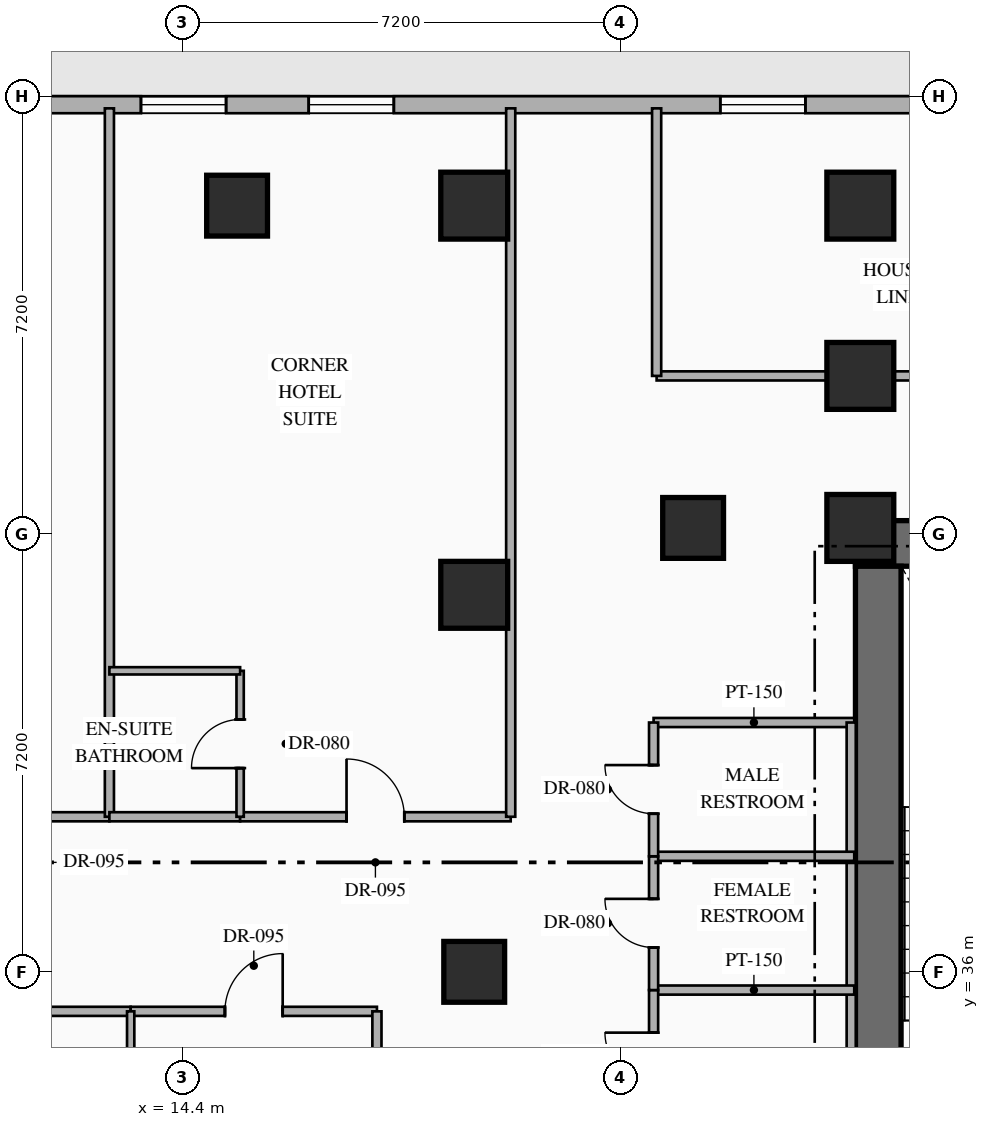
"""IFC4 building model, lengths in metres.
Left out: names, types, materials, properties, quantities, classifications, styles, units other than length and angle.
Written with IfcOpenShell. Run it as: python <this file> out.ifc"""

import sys

from ifc_helpers import new_model, si_unit, direction, frame, frame_2d, origin, origin_2d, place, context, subcontext, project, spatial, rectangle, hollow_rectangle, extrude, element, fill, save


model = new_model("IFC4")
c1 = context("Model", 3, precision=1e-05, world=origin(), true_north=direction((0.0, 1.0)))
c2 = subcontext(c1, "Body", "Model", "MODEL_VIEW")
j1 = project(units=[si_unit("LENGTHUNIT", "METRE"), si_unit("PLANEANGLEUNIT", "RADIAN")], contexts=[c1])
p1 = place(None, origin())
s1 = spatial("IfcSite", under=j1, at=p1, CompositionType="ELEMENT")
p2 = place(p1, origin())
s2 = spatial("IfcBuilding", under=s1, at=p2, CompositionType="ELEMENT")
p3 = place(p2, frame((0.0, 0.0, 50.0)))
s3 = spatial("IfcBuildingStorey", under=s2, at=p3, CompositionType="ELEMENT", Elevation=50.0)
p4 = place(p3, frame((25.47, 43.045, 0.0), z_axis=(0.0, 0.0, 1.0), x_axis=(1.0, 0.0, 0.0)))
e1 = element("IfcWall", 1, at=p4, inside=s3, PredefinedType="SHEAR", context=c2, shape_type="SweptSolid", body=[
    extrude(rectangle(XDim=8.08, YDim=0.75, at=frame_2d((4.04, 0.0))), origin(), (0.0, 0.0, 1.0), 3.35),
])
p5 = place(p3, frame((25.845, 33.19, 0.0), z_axis=(0.0, 0.0, 1.0), x_axis=(0.0, 1.0, 0.0)))
e2 = element("IfcWall", 2, at=p5, inside=s3, PredefinedType="SHEAR", context=c2, shape_type="SweptSolid", body=[
    extrude(rectangle(XDim=9.48, YDim=0.75, at=frame_2d((4.74, 0.0))), origin(), (0.0, 0.0, 1.0), 3.35),
])
p6 = place(p3, frame((25.55, 43.3, 0.0), z_axis=(0.0, 0.0, 1.0), x_axis=(1.0, 0.0, 0.0)))
e3 = element("IfcColumn", 3, at=p6, inside=s3, PredefinedType="COLUMN", context=c2, shape_type="SweptSolid", body=[
    extrude(rectangle(XDim=1.1, YDim=1.1, at=origin_2d()), origin(), (0.0, 0.0, 1.0), 3.35),
])
for number, where, z_axis, x_axis in (
    (4, (25.55, 45.8, 0.0), (0.0, 0.0, 1.0), (1.0, 0.0, 0.0)),
    (5, (19.2, 48.6, 0.0), (0.0, 0.0, 1.0), (1.0, 0.0, 0.0)),
    (6, (25.55, 48.6, 0.0), (0.0, 0.0, 1.0), (1.0, 0.0, 0.0)),
    (7, (19.2, 42.2, 0.0), (0.0, 0.0, 1.0), (1.0, 0.0, 0.0)),
):
    element("IfcColumn", number, at=place(p3, frame(where, z_axis=z_axis, x_axis=x_axis)), inside=s3, PredefinedType="COLUMN", context=c2, shape_type="SweptSolid", body=[
        extrude(hollow_rectangle(XDim=1.1, YDim=1.1, WallThickness=0.04, at=origin_2d()), origin(), (0.0, 0.0, 1.0), 3.35),
    ])
for number, where, z_axis, x_axis in (
    (8, (22.8, 43.3, 0.0), (0.0, 0.0, 1.0), (1.0, 0.0, 0.0)),
    (9, (19.2, 36.0, 0.0), (0.0, 0.0, 1.0), (1.0, 0.0, 0.0)),
    (10, (15.3, 48.6, 0.0), (0.0, 0.0, 1.0), (1.0, 0.0, 0.0)),
):
    element("IfcColumn", number, at=place(p3, frame(where, z_axis=z_axis, x_axis=x_axis)), inside=s3, PredefinedType="COLUMN", context=c2, shape_type="SweptSolid", body=[
        extrude(hollow_rectangle(XDim=1.0, YDim=1.0, WallThickness=0.038, at=origin_2d()), origin(), (0.0, 0.0, 1.0), 3.35),
    ])
p7 = place(p3, frame((2.458, 50.26, 0.0), z_axis=(0.0, 0.0, 1.0), x_axis=(1.0, 0.0, 0.0)))
e11 = element("IfcWall", 11, at=p7, inside=s3, PredefinedType="STANDARD", context=c2, shape_type="SweptSolid", body=[
    extrude(rectangle(XDim=40.084, YDim=0.28, at=frame_2d((20.042, 0.0))), origin(), (0.0, 0.0, 1.0), 3.13),
])
p8 = place(p7, frame((25.905, 0.0, 0.0)))
e12 = element("IfcOpeningElement", 12, at=p8, cuts=e11, PredefinedType="OPENING", context=c2, shape_type="SweptSolid", body=[
    extrude(rectangle(XDim=1.1, YDim=2.2, at=frame_2d((0.55, 1.1))), frame((0.0, 0.15, 0.0), z_axis=(0.0, -1.0, 0.0), x_axis=(1.0, 0.0, 0.0)), (0.0, 0.0, 1.0), 0.3),
])
p9 = place(p7, frame((1.717, 0.0, 0.85)))
e13 = element("IfcOpeningElement", 13, at=p9, cuts=e11, PredefinedType="OPENING", context=c2, shape_type="SweptSolid", body=[
    extrude(rectangle(XDim=1.4, YDim=1.8, at=frame_2d((0.7, 0.9))), frame((0.0, 0.15, 0.0), z_axis=(0.0, -1.0, 0.0), x_axis=(1.0, 0.0, 0.0)), (0.0, 0.0, 1.0), 0.3),
])
p10 = place(p7, frame((5.981, 0.0, 0.85)))
e14 = element("IfcOpeningElement", 14, at=p10, cuts=e11, PredefinedType="OPENING", context=c2, shape_type="SweptSolid", body=[
    extrude(rectangle(XDim=1.4, YDim=1.8, at=frame_2d((0.7, 0.9))), frame((0.0, 0.15, 0.0), z_axis=(0.0, -1.0, 0.0), x_axis=(1.0, 0.0, 0.0)), (0.0, 0.0, 1.0), 0.3),
])
p11 = place(p7, frame((11.261, 0.0, 0.85)))
e15 = element("IfcOpeningElement", 15, at=p11, cuts=e11, PredefinedType="OPENING", context=c2, shape_type="SweptSolid", body=[
    extrude(rectangle(XDim=1.4, YDim=1.8, at=frame_2d((0.7, 0.9))), frame((0.0, 0.15, 0.0), z_axis=(0.0, -1.0, 0.0), x_axis=(1.0, 0.0, 0.0)), (0.0, 0.0, 1.0), 0.3),
])
p12 = place(p7, frame((14.02, 0.0, 0.85)))
e16 = element("IfcOpeningElement", 16, at=p12, cuts=e11, PredefinedType="OPENING", context=c2, shape_type="SweptSolid", body=[
    extrude(rectangle(XDim=1.4, YDim=1.8, at=frame_2d((0.7, 0.9))), frame((0.0, 0.15, 0.0), z_axis=(0.0, -1.0, 0.0), x_axis=(1.0, 0.0, 0.0)), (0.0, 0.0, 1.0), 0.3),
])
p13 = place(p7, frame((20.789, 0.0, 0.85)))
e17 = element("IfcOpeningElement", 17, at=p13, cuts=e11, PredefinedType="OPENING", context=c2, shape_type="SweptSolid", body=[
    extrude(rectangle(XDim=1.4, YDim=1.8, at=frame_2d((0.7, 0.9))), frame((0.0, 0.15, 0.0), z_axis=(0.0, -1.0, 0.0), x_axis=(1.0, 0.0, 0.0)), (0.0, 0.0, 1.0), 0.3),
])
p14 = place(p7, frame((32.703, 0.0, 0.85)))
e18 = element("IfcOpeningElement", 18, at=p14, cuts=e11, PredefinedType="OPENING", context=c2, shape_type="SweptSolid", body=[
    extrude(rectangle(XDim=1.4, YDim=1.8, at=frame_2d((0.7, 0.9))), frame((0.0, 0.15, 0.0), z_axis=(0.0, -1.0, 0.0), x_axis=(1.0, 0.0, 0.0)), (0.0, 0.0, 1.0), 0.3),
])
p15 = place(p7, frame((36.967, 0.0, 0.85)))
e19 = element("IfcOpeningElement", 19, at=p15, cuts=e11, PredefinedType="OPENING", context=c2, shape_type="SweptSolid", body=[
    extrude(rectangle(XDim=1.4, YDim=1.8, at=frame_2d((0.7, 0.9))), frame((0.0, 0.15, 0.0), z_axis=(0.0, -1.0, 0.0), x_axis=(1.0, 0.0, 0.0)), (0.0, 0.0, 1.0), 0.3),
])
p16 = place(p3, frame((22.15, 40.1, 0.0), z_axis=(0.0, 0.0, 1.0), x_axis=(1.0, 0.0, 0.0)))
e20 = element("IfcWall", 20, at=p16, inside=s3, PredefinedType="PARTITIONING", context=c2, shape_type="SweptSolid", body=[
    extrude(rectangle(XDim=3.3, YDim=0.15, at=frame_2d((1.65, 0.0))), origin(), (0.0, 0.0, 1.0), 3.13),
])
p17 = place(p3, frame((25.4, 33.5, 0.0), z_axis=(0.0, 0.0, 1.0), x_axis=(0.0, 1.0, 0.0)))
e21 = element("IfcWall", 21, at=p17, inside=s3, PredefinedType="PARTITIONING", context=c2, shape_type="SweptSolid", body=[
    extrude(rectangle(XDim=6.6, YDim=0.15, at=frame_2d((3.3, 0.0))), origin(), (0.0, 0.0, 1.0), 3.13),
])
for number, where, z_axis, x_axis in (
    (22, (22.15, 35.7, 0.0), (0.0, 0.0, 1.0), (1.0, 0.0, 0.0)),
    (23, (22.15, 37.9, 0.0), (0.0, 0.0, 1.0), (1.0, 0.0, 0.0)),
):
    element("IfcWall", number, at=place(p3, frame(where, z_axis=z_axis, x_axis=x_axis)), inside=s3, PredefinedType="PARTITIONING", context=c2, shape_type="SweptSolid", body=[
        extrude(rectangle(XDim=3.3, YDim=0.15, at=frame_2d((1.65, 0.0))), origin(), (0.0, 0.0, 1.0), 3.13),
    ])
p18 = place(p3, frame((22.15, 33.5, 0.0), z_axis=(0.0, 0.0, 1.0), x_axis=(0.0, 1.0, 0.0)))
e24 = element("IfcWall", 24, at=p18, inside=s3, PredefinedType="PARTITIONING", context=c2, shape_type="SweptSolid", body=[
    extrude(rectangle(XDim=2.2, YDim=0.15, at=frame_2d((1.1, 0.0))), origin(), (0.0, 0.0, 1.0), 3.13),
])
p19 = place(p18, frame((0.7, 0.0, 0.0)))
e25 = element("IfcOpeningElement", 25, at=p19, cuts=e24, PredefinedType="OPENING", context=c2, shape_type="SweptSolid", body=[
    extrude(rectangle(XDim=0.8, YDim=2.06, at=frame_2d((0.4, 1.03))), frame((0.0, 0.085, 0.0), z_axis=(0.0, -1.0, 0.0), x_axis=(1.0, 0.0, 0.0)), (0.0, 0.0, 1.0), 0.17),
])
p20 = place(p3, frame((22.15, 35.7, 0.0), z_axis=(0.0, 0.0, 1.0), x_axis=(0.0, 1.0, 0.0)))
e26 = element("IfcWall", 26, at=p20, inside=s3, PredefinedType="PARTITIONING", context=c2, shape_type="SweptSolid", body=[
    extrude(rectangle(XDim=2.2, YDim=0.15, at=frame_2d((1.1, 0.0))), origin(), (0.0, 0.0, 1.0), 3.13),
])
p21 = place(p20, frame((0.7, 0.0, 0.0)))
e27 = element("IfcOpeningElement", 27, at=p21, cuts=e26, PredefinedType="OPENING", context=c2, shape_type="SweptSolid", body=[
    extrude(rectangle(XDim=0.8, YDim=2.06, at=frame_2d((0.4, 1.03))), frame((0.0, 0.085, 0.0), z_axis=(0.0, -1.0, 0.0), x_axis=(1.0, 0.0, 0.0)), (0.0, 0.0, 1.0), 0.17),
])
p22 = place(p3, frame((22.15, 37.9, 0.0), z_axis=(0.0, 0.0, 1.0), x_axis=(0.0, 1.0, 0.0)))
e28 = element("IfcWall", 28, at=p22, inside=s3, PredefinedType="PARTITIONING", context=c2, shape_type="SweptSolid", body=[
    extrude(rectangle(XDim=2.2, YDim=0.15, at=frame_2d((1.1, 0.0))), origin(), (0.0, 0.0, 1.0), 3.13),
])
p23 = place(p22, frame((0.7, 0.0, 0.0)))
e29 = element("IfcOpeningElement", 29, at=p23, cuts=e28, PredefinedType="OPENING", context=c2, shape_type="SweptSolid", body=[
    extrude(rectangle(XDim=0.8, YDim=2.06, at=frame_2d((0.4, 1.03))), frame((0.0, 0.085, 0.0), z_axis=(0.0, -1.0, 0.0), x_axis=(1.0, 0.0, 0.0)), (0.0, 0.0, 1.0), 0.17),
])
p24 = place(p3, frame((22.2, 45.8, 0.0), z_axis=(0.0, 0.0, 1.0), x_axis=(1.0, 0.0, 0.0)))
e30 = element("IfcWall", 30, at=p24, inside=s3, PredefinedType="PARTITIONING", context=c2, shape_type="SweptSolid", body=[
    extrude(rectangle(XDim=9.2, YDim=0.15, at=frame_2d((4.6, 0.0))), origin(), (0.0, 0.0, 1.0), 2.425),
])
p25 = place(p24, frame((5.248, 0.0, 0.0)))
e31 = element("IfcOpeningElement", 31, at=p25, cuts=e30, PredefinedType="OPENING", context=c2, shape_type="SweptSolid", body=[
    extrude(rectangle(XDim=0.95, YDim=2.15, at=frame_2d((0.475, 1.075))), frame((0.0, 0.085, 0.0), z_axis=(0.0, -1.0, 0.0), x_axis=(1.0, 0.0, 0.0)), (0.0, 0.0, 1.0), 0.17),
])
p26 = place(p3, frame((22.2, 45.8, 0.0), z_axis=(0.0, 0.0, 1.0), x_axis=(0.0, 1.0, 0.0)))
e32 = element("IfcWall", 32, at=p26, inside=s3, PredefinedType="PARTITIONING", context=c2, shape_type="SweptSolid", body=[
    extrude(rectangle(XDim=4.4, YDim=0.15, at=frame_2d((2.2, 0.0))), origin(), (0.0, 0.0, 1.0), 3.13),
])
p27 = place(p3, frame((8.95, 38.55, 0.0), z_axis=(0.0, 0.0, 1.0), x_axis=(1.0, 0.0, 0.0)))
e33 = element("IfcWall", 33, at=p27, inside=s3, PredefinedType="PARTITIONING", context=c2, shape_type="SweptSolid", body=[
    extrude(rectangle(XDim=4.25, YDim=0.15, at=frame_2d((2.125, 0.0))), origin(), (0.0, 0.0, 1.0), 2.775),
])
p28 = place(p27, frame((1.65, 0.0, 0.0)))
e34 = element("IfcOpeningElement", 34, at=p28, cuts=e33, PredefinedType="OPENING", context=c2, shape_type="SweptSolid", body=[
    extrude(rectangle(XDim=0.95, YDim=2.15, at=frame_2d((0.475, 1.075))), frame((0.0, 0.085, 0.0), z_axis=(0.0, -1.0, 0.0), x_axis=(1.0, 0.0, 0.0)), (0.0, 0.0, 1.0), 0.17),
])
p29 = place(p3, frame((13.2, 38.55, 0.0), z_axis=(0.0, 0.0, 1.0), x_axis=(0.0, 1.0, 0.0)))
e35 = element("IfcWall", 35, at=p29, inside=s3, PredefinedType="PARTITIONING", context=c2, shape_type="SweptSolid", body=[
    extrude(rectangle(XDim=11.65, YDim=0.15, at=frame_2d((5.825, 0.0))), origin(), (0.0, 0.0, 1.0), 3.13),
])
p30 = place(p3, frame((13.2, 38.55, 0.0), z_axis=(0.0, 0.0, 1.0), x_axis=(1.0, 0.0, 0.0)))
e36 = element("IfcWall", 36, at=p30, inside=s3, PredefinedType="PARTITIONING", context=c2, shape_type="SweptSolid", body=[
    extrude(rectangle(XDim=2.15, YDim=0.15, at=frame_2d((1.075, 0.0))), origin(), (0.0, 0.0, 1.0), 2.775),
])
p31 = place(p3, frame((15.35, 38.55, 0.0), z_axis=(0.0, 0.0, 1.0), x_axis=(1.0, 0.0, 0.0)))
e37 = element("IfcWall", 37, at=p31, inside=s3, PredefinedType="PARTITIONING", context=c2, shape_type="SweptSolid", body=[
    extrude(rectangle(XDim=4.45, YDim=0.15, at=frame_2d((2.225, 0.0))), origin(), (0.0, 0.0, 1.0), 2.775),
])
p32 = place(p31, frame((1.75, 0.0, 0.0)))
e38 = element("IfcOpeningElement", 38, at=p32, cuts=e37, PredefinedType="OPENING", context=c2, shape_type="SweptSolid", body=[
    extrude(rectangle(XDim=0.95, YDim=2.15, at=frame_2d((0.475, 1.075))), frame((0.0, 0.085, 0.0), z_axis=(0.0, -1.0, 0.0), x_axis=(1.0, 0.0, 0.0)), (0.0, 0.0, 1.0), 0.17),
])
p33 = place(p3, frame((15.35, 38.55, 0.0), z_axis=(0.0, 0.0, 1.0), x_axis=(0.0, 1.0, 0.0)))
e39 = element("IfcWall", 39, at=p33, inside=s3, PredefinedType="PARTITIONING", context=c2, shape_type="SweptSolid", body=[
    extrude(rectangle(XDim=2.4, YDim=0.12, at=frame_2d((1.2, 0.0))), origin(), (0.0, 0.0, 1.0), 3.13),
])
p34 = place(p33, frame((0.8, 0.0, 0.0)))
e40 = element("IfcOpeningElement", 40, at=p34, cuts=e39, PredefinedType="OPENING", context=c2, shape_type="SweptSolid", body=[
    extrude(rectangle(XDim=0.8, YDim=2.06, at=frame_2d((0.4, 1.03))), frame((0.0, 0.07, 0.0), z_axis=(0.0, -1.0, 0.0), x_axis=(1.0, 0.0, 0.0)), (0.0, 0.0, 1.0), 0.14),
])
p35 = place(p3, frame((13.2, 40.95, 0.0), z_axis=(0.0, 0.0, 1.0), x_axis=(1.0, 0.0, 0.0)))
e41 = element("IfcWall", 41, at=p35, inside=s3, PredefinedType="PARTITIONING", context=c2, shape_type="SweptSolid", body=[
    extrude(rectangle(XDim=2.15, YDim=0.12, at=frame_2d((1.075, 0.0))), origin(), (0.0, 0.0, 1.0), 2.775),
])
p36 = place(p3, frame((19.8, 38.55, 0.0), z_axis=(0.0, 0.0, 1.0), x_axis=(0.0, 1.0, 0.0)))
e42 = element("IfcWall", 42, at=p36, inside=s3, PredefinedType="PARTITIONING", context=c2, shape_type="SweptSolid", body=[
    extrude(rectangle(XDim=11.65, YDim=0.15, at=frame_2d((5.825, 0.0))), origin(), (0.0, 0.0, 1.0), 3.13),
])
p37 = place(p3, frame((11.4, 35.35, 0.0), z_axis=(0.0, 0.0, 1.0), x_axis=(1.0, 0.0, 0.0)))
e43 = element("IfcWall", 43, at=p37, inside=s3, PredefinedType="PARTITIONING", context=c2, shape_type="SweptSolid", body=[
    extrude(rectangle(XDim=2.15, YDim=0.15, at=frame_2d((1.075, 0.0))), origin(), (0.0, 0.0, 1.0), 3.13),
])
p38 = place(p3, frame((13.55, 35.35, 0.0), z_axis=(0.0, 0.0, 1.0), x_axis=(1.0, 0.0, 0.0)))
e44 = element("IfcWall", 44, at=p38, inside=s3, PredefinedType="PARTITIONING", context=c2, shape_type="SweptSolid", body=[
    extrude(rectangle(XDim=4.05, YDim=0.15, at=frame_2d((2.025, 0.0))), origin(), (0.0, 0.0, 1.0), 3.13),
])
p39 = place(p38, frame((1.55, 0.0, 0.0)))
e45 = element("IfcOpeningElement", 45, at=p39, cuts=e44, PredefinedType="OPENING", context=c2, shape_type="SweptSolid", body=[
    extrude(rectangle(XDim=0.95, YDim=2.15, at=frame_2d((0.475, 1.075))), frame((0.0, 0.085, 0.0), z_axis=(0.0, -1.0, 0.0), x_axis=(1.0, 0.0, 0.0)), (0.0, 0.0, 1.0), 0.17),
])
p40 = place(p3, frame((13.55, 32.95, 0.0), z_axis=(0.0, 0.0, 1.0), x_axis=(0.0, 1.0, 0.0)))
e46 = element("IfcWall", 46, at=p40, inside=s3, PredefinedType="PARTITIONING", context=c2, shape_type="SweptSolid", body=[
    extrude(rectangle(XDim=2.4, YDim=0.12, at=frame_2d((1.2, 0.0))), origin(), (0.0, 0.0, 1.0), 3.13),
])
p41 = place(p40, frame((0.8, 0.0, 0.0)))
e47 = element("IfcOpeningElement", 47, at=p41, cuts=e46, PredefinedType="OPENING", context=c2, shape_type="SweptSolid", body=[
    extrude(rectangle(XDim=0.8, YDim=2.06, at=frame_2d((0.4, 1.03))), frame((0.0, 0.07, 0.0), z_axis=(0.0, -1.0, 0.0), x_axis=(1.0, 0.0, 0.0)), (0.0, 0.0, 1.0), 0.14),
])
p42 = place(p3, frame((17.6, 23.6, 0.0), z_axis=(0.0, 0.0, 1.0), x_axis=(0.0, 1.0, 0.0)))
e48 = element("IfcWall", 48, at=p42, inside=s3, PredefinedType="PARTITIONING", context=c2, shape_type="SweptSolid", body=[
    extrude(rectangle(XDim=11.75, YDim=0.15, at=frame_2d((5.875, 0.0))), origin(), (0.0, 0.0, 1.0), 3.13),
])
p43 = place(p11, origin())
e49 = element("IfcWindow", 49, at=p43, inside=s3, PartitioningType="SINGLE_PANEL", PredefinedType="WINDOW", context=c2, shape_type="SweptSolid", body=[
    extrude(rectangle(XDim=1.4, YDim=1.8, at=frame_2d((0.7, 0.9))), frame((0.0, 0.03, 0.0), z_axis=(0.0, -1.0, 0.0), x_axis=(1.0, 0.0, 0.0)), (0.0, 0.0, 1.0), 0.06),
])
fill(e15, e49)
p44 = place(p12, origin())
e50 = element("IfcWindow", 50, at=p44, inside=s3, PartitioningType="SINGLE_PANEL", PredefinedType="WINDOW", context=c2, shape_type="SweptSolid", body=[
    extrude(rectangle(XDim=1.4, YDim=1.8, at=frame_2d((0.7, 0.9))), frame((0.0, 0.03, 0.0), z_axis=(0.0, -1.0, 0.0), x_axis=(1.0, 0.0, 0.0)), (0.0, 0.0, 1.0), 0.06),
])
fill(e16, e50)
p45 = place(p13, origin())
e51 = element("IfcWindow", 51, at=p45, inside=s3, PartitioningType="SINGLE_PANEL", PredefinedType="WINDOW", context=c2, shape_type="SweptSolid", body=[
    extrude(rectangle(XDim=1.4, YDim=1.8, at=frame_2d((0.7, 0.9))), frame((0.0, 0.03, 0.0), z_axis=(0.0, -1.0, 0.0), x_axis=(1.0, 0.0, 0.0)), (0.0, 0.0, 1.0), 0.06),
])
fill(e17, e51)
p46 = place(p19, origin())
e52 = element("IfcDoor", 52, at=p46, inside=s3, OperationType="SINGLE_SWING_RIGHT", PredefinedType="DOOR", context=c2, shape_type="SweptSolid", body=[
    extrude(rectangle(XDim=0.8, YDim=2.06, at=frame_2d((0.4, 1.03))), frame((0.0, 0.025, 0.0), z_axis=(0.0, -1.0, 0.0), x_axis=(1.0, 0.0, 0.0)), (0.0, 0.0, 1.0), 0.05),
])
fill(e25, e52)
p47 = place(p21, origin())
e53 = element("IfcDoor", 53, at=p47, inside=s3, OperationType="SINGLE_SWING_RIGHT", PredefinedType="DOOR", context=c2, shape_type="SweptSolid", body=[
    extrude(rectangle(XDim=0.8, YDim=2.06, at=frame_2d((0.4, 1.03))), frame((0.0, 0.025, 0.0), z_axis=(0.0, -1.0, 0.0), x_axis=(1.0, 0.0, 0.0)), (0.0, 0.0, 1.0), 0.05),
])
fill(e27, e53)
p48 = place(p23, origin())
e54 = element("IfcDoor", 54, at=p48, inside=s3, OperationType="SINGLE_SWING_RIGHT", PredefinedType="DOOR", context=c2, shape_type="SweptSolid", body=[
    extrude(rectangle(XDim=0.8, YDim=2.06, at=frame_2d((0.4, 1.03))), frame((0.0, 0.025, 0.0), z_axis=(0.0, -1.0, 0.0), x_axis=(1.0, 0.0, 0.0)), (0.0, 0.0, 1.0), 0.05),
])
fill(e29, e54)
p49 = place(p32, origin())
e55 = element("IfcDoor", 55, at=p49, inside=s3, OperationType="SINGLE_SWING_LEFT", PredefinedType="DOOR", context=c2, shape_type="SweptSolid", body=[
    extrude(rectangle(XDim=0.95, YDim=2.15, at=frame_2d((0.475, 1.075))), frame((0.0, 0.025, 0.0), z_axis=(0.0, -1.0, 0.0), x_axis=(1.0, 0.0, 0.0)), (0.0, 0.0, 1.0), 0.05),
])
fill(e38, e55)
p50 = place(p34, origin())
e56 = element("IfcDoor", 56, at=p50, inside=s3, OperationType="SINGLE_SWING_LEFT", PredefinedType="DOOR", context=c2, shape_type="SweptSolid", body=[
    extrude(rectangle(XDim=0.8, YDim=2.06, at=frame_2d((0.4, 1.03))), frame((0.0, 0.025, 0.0), z_axis=(0.0, -1.0, 0.0), x_axis=(1.0, 0.0, 0.0)), (0.0, 0.0, 1.0), 0.05),
])
fill(e40, e56)
p51 = place(p39, origin())
e57 = element("IfcDoor", 57, at=p51, inside=s3, OperationType="SINGLE_SWING_RIGHT", PredefinedType="DOOR", context=c2, shape_type="SweptSolid", body=[
    extrude(rectangle(XDim=0.95, YDim=2.15, at=frame_2d((0.475, 1.075))), frame((0.0, 0.025, 0.0), z_axis=(0.0, -1.0, 0.0), x_axis=(1.0, 0.0, 0.0)), (0.0, 0.0, 1.0), 0.05),
])
fill(e45, e57)
save(model, sys.argv[1])
